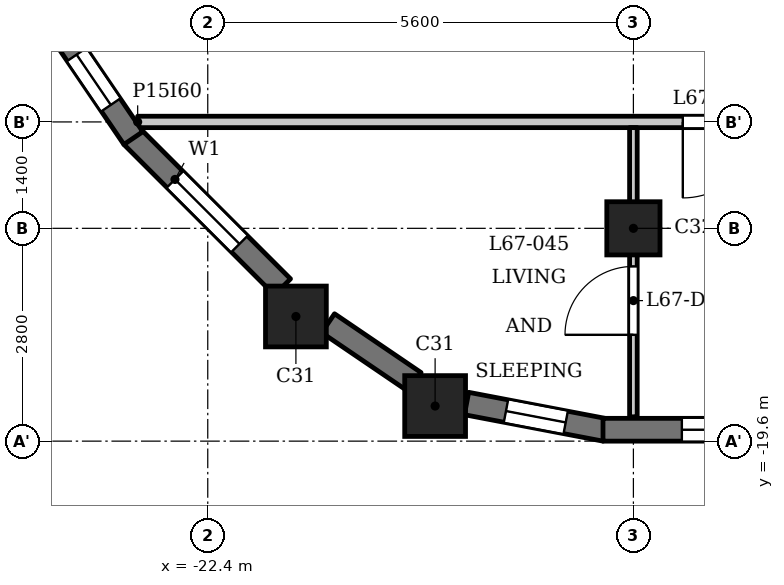
"""IFC4 building model, lengths in metres.
Left out: names, types, materials, properties, quantities, classifications, styles, units other than length and angle.
Written with IfcOpenShell. Run it as: python <this file> out.ifc"""

import sys

from ifc_helpers import new_model, si_unit, direction, frame, frame_2d, origin, origin_2d, place, context, subcontext, project, spatial, rectangle, extrude, element, fill, save


model = new_model("IFC4")
c1 = context("Model", 3, precision=1e-05, world=origin(), true_north=direction((0.0, 1.0)))
c2 = subcontext(c1, "Body", "Model", "MODEL_VIEW")
j1 = project(units=[si_unit("LENGTHUNIT", "METRE"), si_unit("PLANEANGLEUNIT", "RADIAN")], contexts=[c1])
p1 = place(None, origin())
s1 = spatial("IfcSite", under=j1, at=p1, CompositionType="ELEMENT")
p2 = place(p1, origin())
s2 = spatial("IfcBuilding", under=s1, at=p2, CompositionType="ELEMENT")
p3 = place(p2, frame((0.0, 0.0, 259.2)))
s3 = spatial("IfcBuildingStorey", under=s2, at=p3, CompositionType="ELEMENT", Elevation=259.2)
for number, where, z_axis, x_axis in (
    (1, (-19.409, -19.138, 0.0), (0.0, 0.0, 1.0), (1.0, 0.0, 0.0)),
    (2, (-21.24, -17.96, 0.0), (0.0, 0.0, 1.0), (1.0, 0.0, 0.0)),
):
    element("IfcColumn", number, at=place(p3, frame(where, z_axis=z_axis, x_axis=x_axis)), inside=s3, PredefinedType="COLUMN", context=c2, shape_type="SweptSolid", body=[
        extrude(rectangle(XDim=0.8, YDim=0.8, at=origin_2d()), origin(), (0.0, 0.0, 1.0), 3.5),
    ])
p4 = place(p3, frame((-16.8, -16.8, 0.0), z_axis=(0.0, 0.0, 1.0), x_axis=(1.0, 0.0, 0.0)))
e3 = element("IfcColumn", 3, at=p4, inside=s3, PredefinedType="COLUMN", context=c2, shape_type="SweptSolid", body=[
    extrude(rectangle(XDim=0.7, YDim=0.7, at=origin_2d()), origin(), (0.0, 0.0, 1.0), 3.5),
])
p5 = place(p3, frame((-23.397, -15.591, 0.0), z_axis=(0.0, 0.0, 1.0), x_axis=(0.707150377276, -0.707063182409, 0.0)))
e4 = element("IfcWall", 4, at=p5, inside=s3, PredefinedType="SOLIDWALL", context=c2, shape_type="SweptSolid", body=[
    extrude(rectangle(XDim=2.8, YDim=0.3, at=frame_2d((1.4, 0.0))), origin(), (0.0, 0.0, 1.0), 2.55),
])
p6 = place(p5, frame((0.8, 0.0, 0.6)))
e5 = element("IfcOpeningElement", 5, at=p6, cuts=e4, PredefinedType="OPENING", context=c2, shape_type="SweptSolid", body=[
    extrude(rectangle(XDim=1.2, YDim=1.55, at=frame_2d((0.6, 0.775))), frame((0.0, 0.16, 0.0), z_axis=(0.0, -1.0, 0.0), x_axis=(1.0, 0.0, 0.0)), (0.0, 0.0, 1.0), 0.32),
])
p7 = place(p3, frame((-20.817, -18.048, 0.0), z_axis=(0.0, 0.0, 1.0), x_axis=(0.827025410886, -0.562164539747, 0.0)))
e6 = element("IfcWall", 6, at=p7, inside=s3, PredefinedType="SOLIDWALL", context=c2, shape_type="SweptSolid", body=[
    extrude(rectangle(XDim=1.377, YDim=0.3, at=frame_2d((0.688, 0.0))), origin(), (0.0, 0.0, 1.0), 2.55),
])
p8 = place(p3, frame((-18.995, -19.105, 0.0), z_axis=(0.0, 0.0, 1.0), x_axis=(0.982301706131, -0.187305520826, 0.0)))
e7 = element("IfcWall", 7, at=p8, inside=s3, PredefinedType="SOLIDWALL", context=c2, shape_type="SweptSolid", body=[
    extrude(rectangle(XDim=1.856, YDim=0.3, at=frame_2d((0.928, 0.0))), origin(), (0.0, 0.0, 1.0), 2.55),
])
p9 = place(p8, frame((0.528, 0.0, 0.6)))
e8 = element("IfcOpeningElement", 8, at=p9, cuts=e7, PredefinedType="OPENING", context=c2, shape_type="SweptSolid", body=[
    extrude(rectangle(XDim=0.8, YDim=1.55, at=frame_2d((0.4, 0.775))), frame((0.0, 0.16, 0.0), z_axis=(0.0, -1.0, 0.0), x_axis=(1.0, 0.0, 0.0)), (0.0, 0.0, 1.0), 0.32),
])
p10 = place(p3, frame((-17.2, -19.45, 0.0), z_axis=(0.0, 0.0, 1.0), x_axis=(1.0, 0.0, 0.0)))
e9 = element("IfcWall", 9, at=p10, inside=s3, PredefinedType="SOLIDWALL", context=c2, shape_type="SweptSolid", body=[
    extrude(rectangle(XDim=2.8, YDim=0.3, at=frame_2d((1.4, 0.0))), origin(), (0.0, 0.0, 1.0), 2.55),
])
p11 = place(p10, frame((1.038, 0.0, 0.6)))
e10 = element("IfcOpeningElement", 10, at=p11, cuts=e9, PredefinedType="OPENING", context=c2, shape_type="SweptSolid", body=[
    extrude(rectangle(XDim=1.2, YDim=1.55, at=frame_2d((0.6, 0.775))), frame((0.0, 0.16, 0.0), z_axis=(0.0, -1.0, 0.0), x_axis=(1.0, 0.0, 0.0)), (0.0, 0.0, 1.0), 0.32),
])
p12 = place(p3, frame((-24.422, -14.078, 0.0), z_axis=(0.0, 0.0, 1.0), x_axis=(0.562054549384, -0.827100165347, 0.0)))
e11 = element("IfcWall", 11, at=p12, inside=s3, PredefinedType="SOLIDWALL", context=c2, shape_type="SweptSolid", body=[
    extrude(rectangle(XDim=1.856, YDim=0.3, at=frame_2d((0.928, 0.0))), origin(), (0.0, 0.0, 1.0), 2.55),
])
p13 = place(p12, frame((0.528, 0.0, 0.6)))
e12 = element("IfcOpeningElement", 12, at=p13, cuts=e11, PredefinedType="OPENING", context=c2, shape_type="SweptSolid", body=[
    extrude(rectangle(XDim=0.8, YDim=1.55, at=frame_2d((0.4, 0.775))), frame((0.0, 0.16, 0.0), z_axis=(0.0, -1.0, 0.0), x_axis=(1.0, 0.0, 0.0)), (0.0, 0.0, 1.0), 0.32),
])
p14 = place(p3, frame((-23.322, -15.4, 0.0), z_axis=(0.0, 0.0, 1.0), x_axis=(1.0, 0.0, 0.0)))
e13 = element("IfcWall", 13, at=p14, inside=s3, PredefinedType="PARTITIONING", context=c2, shape_type="SweptSolid", body=[
    extrude(rectangle(XDim=46.872, YDim=0.15, at=frame_2d((23.436, 0.0))), origin(), (0.0, 0.0, 1.0), 3.2),
])
p15 = place(p14, frame((7.172, 0.0, 0.0)))
e14 = element("IfcOpeningElement", 14, at=p15, cuts=e13, PredefinedType="OPENING", context=c2, shape_type="SweptSolid", body=[
    extrude(rectangle(XDim=1.0, YDim=2.1, at=frame_2d((0.5, 1.05))), frame((0.0, 0.085, 0.0), z_axis=(0.0, -1.0, 0.0), x_axis=(1.0, 0.0, 0.0)), (0.0, 0.0, 1.0), 0.17),
])
p16 = place(p14, frame((14.922, 0.0, 0.0)))
e15 = element("IfcOpeningElement", 15, at=p16, cuts=e13, PredefinedType="OPENING", context=c2, shape_type="SweptSolid", body=[
    extrude(rectangle(XDim=1.0, YDim=2.1, at=frame_2d((0.5, 1.05))), frame((0.0, 0.085, 0.0), z_axis=(0.0, -1.0, 0.0), x_axis=(1.0, 0.0, 0.0)), (0.0, 0.0, 1.0), 0.17),
])
p17 = place(p14, frame((26.372, 0.0, 0.0)))
e16 = element("IfcOpeningElement", 16, at=p17, cuts=e13, PredefinedType="OPENING", context=c2, shape_type="SweptSolid", body=[
    extrude(rectangle(XDim=1.0, YDim=2.1, at=frame_2d((0.5, 1.05))), frame((0.0, 0.085, 0.0), z_axis=(0.0, -1.0, 0.0), x_axis=(1.0, 0.0, 0.0)), (0.0, 0.0, 1.0), 0.17),
])
p18 = place(p14, frame((38.572, 0.0, 0.0)))
e17 = element("IfcOpeningElement", 17, at=p18, cuts=e13, PredefinedType="OPENING", context=c2, shape_type="SweptSolid", body=[
    extrude(rectangle(XDim=1.0, YDim=2.1, at=frame_2d((0.5, 1.05))), frame((0.0, 0.085, 0.0), z_axis=(0.0, -1.0, 0.0), x_axis=(1.0, 0.0, 0.0)), (0.0, 0.0, 1.0), 0.17),
])
p19 = place(p3, frame((-16.8, -19.28, 0.0), z_axis=(0.0, 0.0, 1.0), x_axis=(0.0, 1.0, 0.0)))
e18 = element("IfcWall", 18, at=p19, inside=s3, PredefinedType="PARTITIONING", context=c2, shape_type="SweptSolid", body=[
    extrude(rectangle(XDim=3.805, YDim=0.1, at=frame_2d((1.902, 0.0))), origin(), (0.0, 0.0, 1.0), 3.2),
])
p20 = place(p19, frame((1.079, 0.0, 0.0)))
e19 = element("IfcOpeningElement", 19, at=p20, cuts=e18, PredefinedType="OPENING", context=c2, shape_type="SweptSolid", body=[
    extrude(rectangle(XDim=0.9, YDim=2.1, at=frame_2d((0.45, 1.05))), frame((0.0, 0.06, 0.0), z_axis=(0.0, -1.0, 0.0), x_axis=(1.0, 0.0, 0.0)), (0.0, 0.0, 1.0), 0.12),
])
p21 = place(p15, origin())
e20 = element("IfcDoor", 20, at=p21, inside=s3, OperationType="SINGLE_SWING_LEFT", PredefinedType="DOOR", context=c2, shape_type="SweptSolid", body=[
    extrude(rectangle(XDim=1.0, YDim=2.1, at=frame_2d((0.5, 1.05))), frame((0.0, 0.025, 0.0), z_axis=(0.0, -1.0, 0.0), x_axis=(1.0, 0.0, 0.0)), (0.0, 0.0, 1.0), 0.05),
])
fill(e14, e20)
p22 = place(p20, origin())
e21 = element("IfcDoor", 21, at=p22, inside=s3, OperationType="SINGLE_SWING_RIGHT", PredefinedType="DOOR", context=c2, shape_type="SweptSolid", body=[
    extrude(rectangle(XDim=0.9, YDim=2.1, at=frame_2d((0.45, 1.05))), frame((0.0, 0.025, 0.0), z_axis=(0.0, -1.0, 0.0), x_axis=(1.0, 0.0, 0.0)), (0.0, 0.0, 1.0), 0.05),
])
fill(e19, e21)
p23 = place(p6, origin())
e22 = element("IfcWindow", 22, at=p23, inside=s3, PartitioningType="SINGLE_PANEL", PredefinedType="WINDOW", context=c2, shape_type="SweptSolid", body=[
    extrude(rectangle(XDim=1.2, YDim=1.55, at=frame_2d((0.6, 0.775))), frame((0.0, 0.03, 0.0), z_axis=(0.0, -1.0, 0.0), x_axis=(1.0, 0.0, 0.0)), (0.0, 0.0, 1.0), 0.06),
])
fill(e5, e22)
p24 = place(p9, origin())
e23 = element("IfcWindow", 23, at=p24, inside=s3, PartitioningType="SINGLE_PANEL", PredefinedType="WINDOW", context=c2, shape_type="SweptSolid", body=[
    extrude(rectangle(XDim=0.8, YDim=1.55, at=frame_2d((0.4, 0.775))), frame((0.0, 0.03, 0.0), z_axis=(0.0, -1.0, 0.0), x_axis=(1.0, 0.0, 0.0)), (0.0, 0.0, 1.0), 0.06),
])
fill(e8, e23)
p25 = place(p11, origin())
e24 = element("IfcWindow", 24, at=p25, inside=s3, PartitioningType="SINGLE_PANEL", PredefinedType="WINDOW", context=c2, shape_type="SweptSolid", body=[
    extrude(rectangle(XDim=1.2, YDim=1.55, at=frame_2d((0.6, 0.775))), frame((0.0, 0.03, 0.0), z_axis=(0.0, -1.0, 0.0), x_axis=(1.0, 0.0, 0.0)), (0.0, 0.0, 1.0), 0.06),
])
fill(e10, e24)
p26 = place(p13, origin())
e25 = element("IfcWindow", 25, at=p26, inside=s3, PartitioningType="SINGLE_PANEL", PredefinedType="WINDOW", context=c2, shape_type="SweptSolid", body=[
    extrude(rectangle(XDim=0.8, YDim=1.55, at=frame_2d((0.4, 0.775))), frame((0.0, 0.03, 0.0), z_axis=(0.0, -1.0, 0.0), x_axis=(1.0, 0.0, 0.0)), (0.0, 0.0, 1.0), 0.06),
])
fill(e12, e25)
save(model, sys.argv[1])
